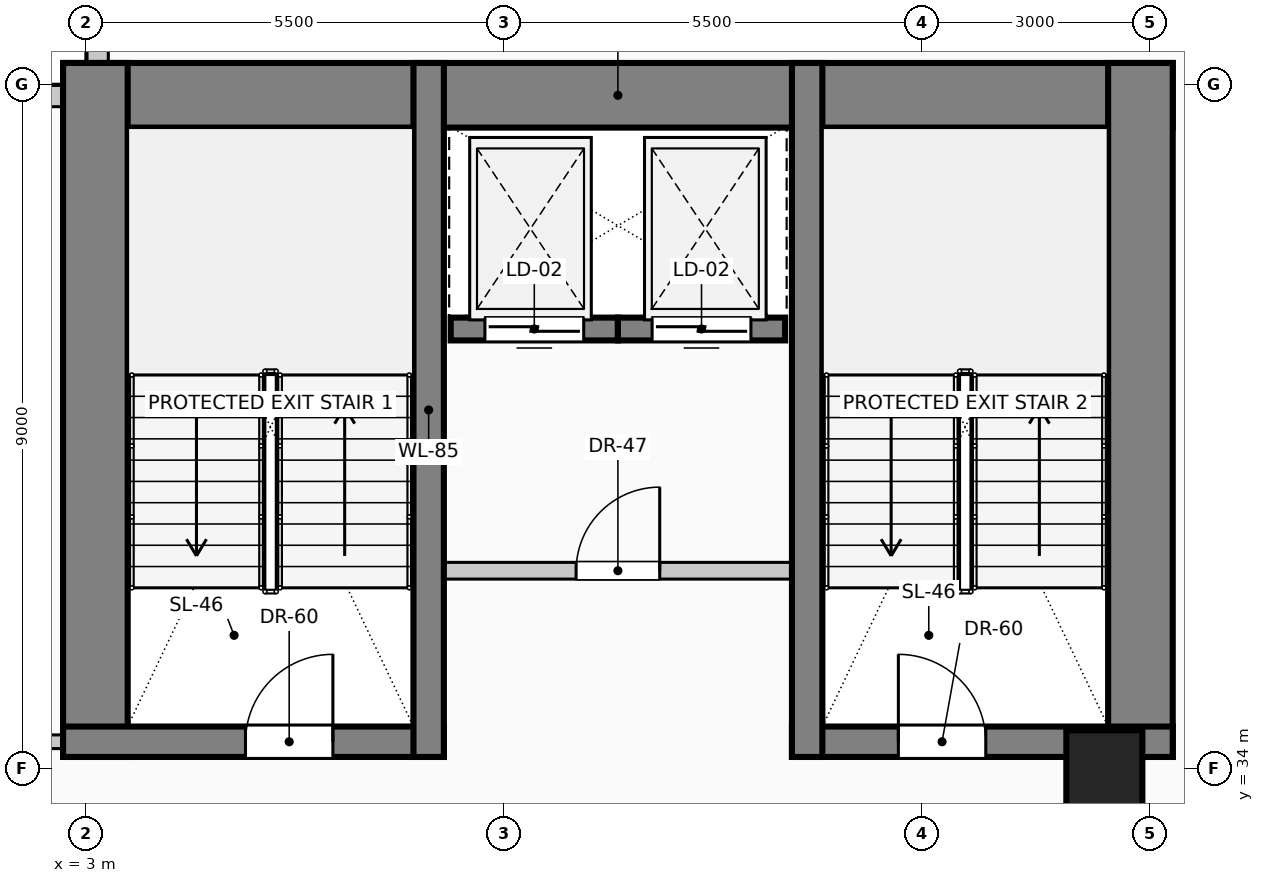
"""IFC4 building model, lengths in metres.
Left out: names, types, materials, properties, quantities, classifications, styles, units other than length and angle.
Written with IfcOpenShell. Run it as: python <this file> out.ifc"""

import sys

from ifc_helpers import new_model, si_unit, direction, frame, frame_2d, origin, origin_2d, place, context, subcontext, project, spatial, rectangle, circle, extrude, element, fill, save


model = new_model("IFC4")
c1 = context("Model", 3, precision=1e-05, world=origin(), true_north=direction((0.0, 1.0)))
c2 = subcontext(c1, "Body", "Model", "MODEL_VIEW")
j1 = project(units=[si_unit("LENGTHUNIT", "METRE"), si_unit("PLANEANGLEUNIT", "RADIAN")], contexts=[c1])
p1 = place(None, origin())
s1 = spatial("IfcSite", under=j1, at=p1, CompositionType="ELEMENT")
p2 = place(p1, origin())
s2 = spatial("IfcBuilding", under=s1, at=p2, CompositionType="ELEMENT")
p3 = place(p2, frame((0.0, 0.0, 152.6)))
s3 = spatial("IfcBuildingStorey", under=s2, at=p3, CompositionType="ELEMENT", Elevation=152.6)
p4 = place(p3, frame((2.7, 42.855, 0.0), z_axis=(0.0, 0.0, 1.0), x_axis=(1.0, 0.0, 0.0)))
e1 = element("IfcWall", 1, at=p4, inside=s3, PredefinedType="SHEAR", context=c2, shape_type="SweptSolid", body=[
    extrude(rectangle(XDim=14.6, YDim=0.85, at=frame_2d((7.3, 0.0))), origin(), (0.0, 0.0, 1.0), 4.0),
])
for number, where, z_axis, x_axis in (
    (2, (3.125, 34.15, 0.0), (0.0, 0.0, 1.0), (0.0, 1.0, 0.0)),
    (3, (16.875, 34.15, 0.0), (0.0, 0.0, 1.0), (0.0, 1.0, 0.0)),
):
    element("IfcWall", number, at=place(p3, frame(where, z_axis=z_axis, x_axis=x_axis)), inside=s3, PredefinedType="SHEAR", context=c2, shape_type="SweptSolid", body=[
        extrude(rectangle(XDim=9.13, YDim=0.85, at=frame_2d((4.565, 0.0))), origin(), (0.0, 0.0, 1.0), 4.0),
    ])
p5 = place(p3, frame((2.7, 34.35, 0.0), z_axis=(0.0, 0.0, 1.0), x_axis=(1.0, 0.0, 0.0)))
e4 = element("IfcWall", 4, at=p5, inside=s3, PredefinedType="SHEAR", context=c2, shape_type="SweptSolid", body=[
    extrude(rectangle(XDim=5.01, YDim=0.4, at=frame_2d((2.505, 0.0))), origin(), (0.0, 0.0, 1.0), 4.0),
])
p6 = place(p5, frame((2.4, 0.0, 0.0)))
e5 = element("IfcOpeningElement", 5, at=p6, cuts=e4, PredefinedType="OPENING", context=c2, shape_type="SweptSolid", body=[
    extrude(rectangle(XDim=1.15, YDim=2.2, at=frame_2d((0.575, 1.1))), frame((0.0, 0.21, 0.0), z_axis=(0.0, -1.0, 0.0), x_axis=(1.0, 0.0, 0.0)), (0.0, 0.0, 1.0), 0.42),
])
p7 = place(p3, frame((12.29, 34.35, 0.0), z_axis=(0.0, 0.0, 1.0), x_axis=(1.0, 0.0, 0.0)))
e6 = element("IfcWall", 6, at=p7, inside=s3, PredefinedType="SHEAR", context=c2, shape_type="SweptSolid", body=[
    extrude(rectangle(XDim=5.01, YDim=0.4, at=frame_2d((2.505, 0.0))), origin(), (0.0, 0.0, 1.0), 4.0),
])
p8 = place(p7, frame((1.4, 0.0, 0.0)))
e7 = element("IfcOpeningElement", 7, at=p8, cuts=e6, PredefinedType="OPENING", context=c2, shape_type="SweptSolid", body=[
    extrude(rectangle(XDim=1.15, YDim=2.2, at=frame_2d((0.575, 1.1))), frame((0.0, 0.21, 0.0), z_axis=(0.0, -1.0, 0.0), x_axis=(1.0, 0.0, 0.0)), (0.0, 0.0, 1.0), 0.42),
])
for number, where, z_axis, x_axis in (
    (8, (7.51, 34.15, 0.0), (0.0, 0.0, 1.0), (0.0, 1.0, 0.0)),
    (9, (12.49, 34.15, 0.0), (0.0, 0.0, 1.0), (0.0, 1.0, 0.0)),
):
    element("IfcWall", number, at=place(p3, frame(where, z_axis=z_axis, x_axis=x_axis)), inside=s3, PredefinedType="SHEAR", context=c2, shape_type="SweptSolid", body=[
        extrude(rectangle(XDim=9.13, YDim=0.4, at=frame_2d((4.565, 0.0))), origin(), (0.0, 0.0, 1.0), 4.0),
    ])
p9 = place(p3, frame((16.4, 34.0, 0.0), z_axis=(0.0, 0.0, 1.0), x_axis=(1.0, 0.0, 0.0)))
e10 = element("IfcColumn", 10, at=p9, inside=s3, PredefinedType="COLUMN", context=c2, shape_type="SweptSolid", body=[
    extrude(circle(Radius=0.5, at=origin_2d()), origin(), (0.0, 0.0, 1.0), 4.0),
])
p10 = place(p3, frame((0.6, 42.845, 0.0), z_axis=(0.0, 0.0, 1.0), x_axis=(1.0, 0.0, 0.0)))
e11 = element("IfcWall", 11, at=p10, inside=s3, PredefinedType="SOLIDWALL", context=c2, shape_type="SweptSolid", body=[
    extrude(rectangle(XDim=2.095, YDim=0.28, at=frame_2d((1.047, 0.0))), origin(), (0.0, 0.0, 1.0), 3.725),
])
p11 = place(p3, frame((3.155, 43.285, 0.0), z_axis=(0.0, 0.0, 1.0), x_axis=(0.0, 1.0, 0.0)))
e12 = element("IfcWall", 12, at=p11, inside=s3, PredefinedType="SOLIDWALL", context=c2, shape_type="SweptSolid", body=[
    extrude(rectangle(XDim=2.115, YDim=0.28, at=frame_2d((1.058, 0.0))), origin(), (0.0, 0.0, 1.0), 3.725),
])
p12 = place(p3, frame((10.0, 39.78, 0.0), z_axis=(0.0, 0.0, 1.0), x_axis=(-1.0, 0.0, 0.0)))
e13 = element("IfcWall", 13, at=p12, inside=s3, PredefinedType="SOLIDWALL", context=c2, shape_type="SweptSolid", body=[
    extrude(rectangle(XDim=2.2, YDim=0.3, at=frame_2d((1.1, 0.0))), origin(), (0.0, 0.0, 1.0), 4.0),
])
p13 = place(p12, frame((0.45, 0.0, 0.0)))
e14 = element("IfcOpeningElement", 14, at=p13, cuts=e13, PredefinedType="OPENING", context=c2, shape_type="SweptSolid", body=[
    extrude(rectangle(XDim=1.3, YDim=2.25, at=frame_2d((0.65, 1.125))), frame((0.0, 0.16, 0.0), z_axis=(0.0, -1.0, 0.0), x_axis=(1.0, 0.0, 0.0)), (0.0, 0.0, 1.0), 0.32),
])
p14 = place(p3, frame((12.2, 39.78, 0.0), z_axis=(0.0, 0.0, 1.0), x_axis=(-1.0, 0.0, 0.0)))
e15 = element("IfcWall", 15, at=p14, inside=s3, PredefinedType="SOLIDWALL", context=c2, shape_type="SweptSolid", body=[
    extrude(rectangle(XDim=2.2, YDim=0.3, at=frame_2d((1.1, 0.0))), origin(), (0.0, 0.0, 1.0), 4.0),
])
p15 = place(p14, frame((0.45, 0.0, 0.0)))
e16 = element("IfcOpeningElement", 16, at=p15, cuts=e15, PredefinedType="OPENING", context=c2, shape_type="SweptSolid", body=[
    extrude(rectangle(XDim=1.3, YDim=2.25, at=frame_2d((0.65, 1.125))), frame((0.0, 0.16, 0.0), z_axis=(0.0, -1.0, 0.0), x_axis=(1.0, 0.0, 0.0)), (0.0, 0.0, 1.0), 0.32),
])
p16 = place(p3, frame((7.51, 36.6, 0.0), z_axis=(0.0, 0.0, 1.0), x_axis=(1.0, 0.0, 0.0)))
e17 = element("IfcWall", 17, at=p16, inside=s3, PredefinedType="PARTITIONING", context=c2, shape_type="SweptSolid", body=[
    extrude(rectangle(XDim=4.98, YDim=0.22, at=frame_2d((2.49, 0.0))), origin(), (0.0, 0.0, 1.0), 3.725),
])
p17 = place(p16, frame((1.94, 0.0, 0.0)))
e18 = element("IfcOpeningElement", 18, at=p17, cuts=e17, PredefinedType="OPENING", context=c2, shape_type="SweptSolid", body=[
    extrude(rectangle(XDim=1.1, YDim=2.2, at=frame_2d((0.55, 1.1))), frame((0.0, 0.12, 0.0), z_axis=(0.0, -1.0, 0.0), x_axis=(1.0, 0.0, 0.0)), (0.0, 0.0, 1.0), 0.24),
])
p18 = place(p3, frame((1.175, 34.35, 0.0), z_axis=(0.0, 0.0, 1.0), x_axis=(1.0, 0.0, 0.0)))
e19 = element("IfcWall", 19, at=p18, inside=s3, PredefinedType="PARTITIONING", context=c2, shape_type="SweptSolid", body=[
    extrude(rectangle(XDim=1.525, YDim=0.18, at=frame_2d((0.762, 0.0))), origin(), (0.0, 0.0, 1.0), 3.725),
])
p19 = place(p13, origin())
e20 = element("IfcDoor", 20, at=p19, inside=s3, OperationType="SLIDING_TO_LEFT", PredefinedType="DOOR", context=c2, shape_type="SweptSolid", body=[
    extrude(rectangle(XDim=1.3, YDim=2.25, at=frame_2d((0.65, 1.125))), frame((0.0, 0.025, 0.0), z_axis=(0.0, -1.0, 0.0), x_axis=(1.0, 0.0, 0.0)), (0.0, 0.0, 1.0), 0.05),
])
fill(e14, e20)
p20 = place(p15, origin())
e21 = element("IfcDoor", 21, at=p20, inside=s3, OperationType="SLIDING_TO_RIGHT", PredefinedType="DOOR", context=c2, shape_type="SweptSolid", body=[
    extrude(rectangle(XDim=1.3, YDim=2.25, at=frame_2d((0.65, 1.125))), frame((0.0, 0.025, 0.0), z_axis=(0.0, -1.0, 0.0), x_axis=(1.0, 0.0, 0.0)), (0.0, 0.0, 1.0), 0.05),
])
fill(e16, e21)
p21 = place(p6, origin())
e22 = element("IfcDoor", 22, at=p21, inside=s3, OperationType="SINGLE_SWING_RIGHT", PredefinedType="DOOR", context=c2, shape_type="SweptSolid", body=[
    extrude(rectangle(XDim=1.15, YDim=2.2, at=frame_2d((0.575, 1.1))), frame((0.0, 0.025, 0.0), z_axis=(0.0, -1.0, 0.0), x_axis=(1.0, 0.0, 0.0)), (0.0, 0.0, 1.0), 0.05),
])
fill(e5, e22)
p22 = place(p8, origin())
e23 = element("IfcDoor", 23, at=p22, inside=s3, OperationType="SINGLE_SWING_LEFT", PredefinedType="DOOR", context=c2, shape_type="SweptSolid", body=[
    extrude(rectangle(XDim=1.15, YDim=2.2, at=frame_2d((0.575, 1.1))), frame((0.0, 0.025, 0.0), z_axis=(0.0, -1.0, 0.0), x_axis=(1.0, 0.0, 0.0)), (0.0, 0.0, 1.0), 0.05),
])
fill(e7, e23)
p23 = place(p17, origin())
e24 = element("IfcDoor", 24, at=p23, inside=s3, OperationType="SINGLE_SWING_RIGHT", PredefinedType="DOOR", context=c2, shape_type="SweptSolid", body=[
    extrude(rectangle(XDim=1.1, YDim=2.2, at=frame_2d((0.55, 1.1))), frame((0.0, 0.025, 0.0), z_axis=(0.0, -1.0, 0.0), x_axis=(1.0, 0.0, 0.0)), (0.0, 0.0, 1.0), 0.05),
])
fill(e18, e24)
save(model, sys.argv[1])
